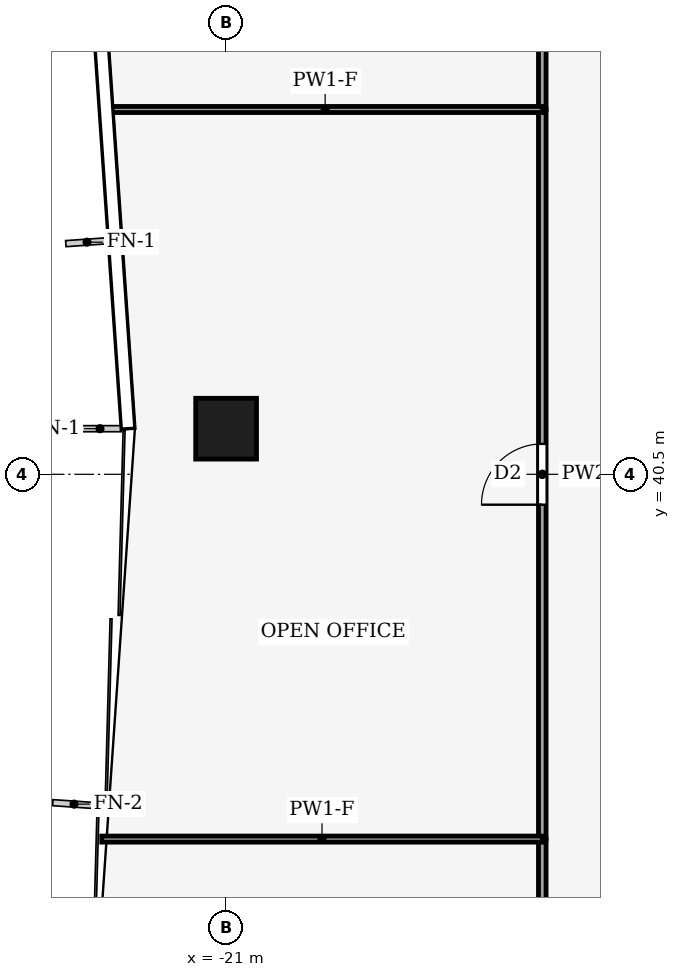
"""IFC4 building model, lengths in metres.
Left out: names, types, materials, properties, quantities, classifications, styles, units other than length and angle.
Written with IfcOpenShell. Run it as: python <this file> out.ifc"""

import sys

from ifc_helpers import new_model, si_unit, direction, frame, frame_2d, origin, origin_2d, place, context, subcontext, project, spatial, rectangle, hollow_rectangle, extrude, element, fill, save


model = new_model("IFC4")
c1 = context("Model", 3, precision=1e-05, world=origin(), true_north=direction((0.0, 1.0)))
c2 = subcontext(c1, "Body", "Model", "MODEL_VIEW")
j1 = project(units=[si_unit("LENGTHUNIT", "METRE"), si_unit("PLANEANGLEUNIT", "RADIAN")], contexts=[c1])
p1 = place(None, origin())
s1 = spatial("IfcSite", under=j1, at=p1, CompositionType="ELEMENT")
p2 = place(p1, origin())
s2 = spatial("IfcBuilding", under=s1, at=p2, CompositionType="ELEMENT")
p3 = place(p2, frame((0.0, 0.0, 238.0)))
s3 = spatial("IfcBuildingStorey", under=s2, at=p3, CompositionType="ELEMENT", Elevation=238.0)
p4 = place(p3, frame((-21.0, 41.25, 0.0), z_axis=(0.0, 0.0, 1.0), x_axis=(1.0, 0.0, 0.0)))
e1 = element("IfcColumn", 1, at=p4, inside=s3, PredefinedType="COLUMN", context=c2, shape_type="SweptSolid", body=[
    extrude(hollow_rectangle(XDim=1.0, YDim=1.0, WallThickness=0.045, at=origin_2d()), origin(), (0.0, 0.0, 1.0), 4.0),
])
p5 = place(p3, frame((-15.8, 25.5, 0.0), z_axis=(0.0, 0.0, 1.0), x_axis=(0.0, 1.0, 0.0)))
e2 = element("IfcWall", 2, at=p5, inside=s3, PredefinedType="PARTITIONING", context=c2, shape_type="SweptSolid", body=[
    extrude(rectangle(XDim=9.0, YDim=0.125, at=frame_2d((4.5, 0.0))), origin(), (0.0, 0.0, 1.0), 3.48),
])
p6 = place(p5, frame((4.0, 0.0, 0.0)))
e3 = element("IfcOpeningElement", 3, at=p6, cuts=e2, PredefinedType="OPENING", context=c2, shape_type="SweptSolid", body=[
    extrude(rectangle(XDim=1.0, YDim=2.1, at=frame_2d((0.5, 1.05))), frame((0.0, 0.073, 0.0), z_axis=(0.0, -1.0, 0.0), x_axis=(1.0, 0.0, 0.0)), (0.0, 0.0, 1.0), 0.145),
])
p7 = place(p3, frame((-15.8, 34.5, 0.0), z_axis=(0.0, 0.0, 1.0), x_axis=(0.0, 1.0, 0.0)))
e4 = element("IfcWall", 4, at=p7, inside=s3, PredefinedType="PARTITIONING", context=c2, shape_type="SweptSolid", body=[
    extrude(rectangle(XDim=12.0, YDim=0.125, at=frame_2d((6.0, 0.0))), origin(), (0.0, 0.0, 1.0), 3.14),
])
p8 = place(p7, frame((5.5, 0.0, 0.0)))
e5 = element("IfcOpeningElement", 5, at=p8, cuts=e4, PredefinedType="OPENING", context=c2, shape_type="SweptSolid", body=[
    extrude(rectangle(XDim=1.0, YDim=2.1, at=frame_2d((0.5, 1.05))), frame((0.0, 0.073, 0.0), z_axis=(0.0, -1.0, 0.0), x_axis=(1.0, 0.0, 0.0)), (0.0, 0.0, 1.0), 0.145),
])
p9 = place(p3, frame((-15.8, 46.5, 0.0), z_axis=(0.0, 0.0, 1.0), x_axis=(0.0, 1.0, 0.0)))
e6 = element("IfcWall", 6, at=p9, inside=s3, PredefinedType="PARTITIONING", context=c2, shape_type="SweptSolid", body=[
    extrude(rectangle(XDim=12.0, YDim=0.125, at=frame_2d((6.0, 0.0))), origin(), (0.0, 0.0, 1.0), 3.24),
])
p10 = place(p9, frame((5.5, 0.0, 0.0)))
e7 = element("IfcOpeningElement", 7, at=p10, cuts=e6, PredefinedType="OPENING", context=c2, shape_type="SweptSolid", body=[
    extrude(rectangle(XDim=1.0, YDim=2.1, at=frame_2d((0.5, 1.05))), frame((0.0, 0.073, 0.0), z_axis=(0.0, -1.0, 0.0), x_axis=(1.0, 0.0, 0.0)), (0.0, 0.0, 1.0), 0.145),
])
p11 = place(p3, frame((-15.8, 34.5, 0.0), z_axis=(0.0, 0.0, 1.0), x_axis=(-1.0, 0.0, 0.0)))
e8 = element("IfcWall", 8, at=p11, inside=s3, PredefinedType="PARTITIONING", context=c2, shape_type="SweptSolid", body=[
    extrude(rectangle(XDim=7.245, YDim=0.1, at=frame_2d((3.623, 0.0))), origin(), (0.0, 0.0, 1.0), 3.04),
])
p12 = place(p3, frame((-15.8, 46.5, 0.0), z_axis=(0.0, 0.0, 1.0), x_axis=(-1.0, 0.0, 0.0)))
e9 = element("IfcWall", 9, at=p12, inside=s3, PredefinedType="PARTITIONING", context=c2, shape_type="SweptSolid", body=[
    extrude(rectangle(XDim=7.142, YDim=0.1, at=frame_2d((3.571, 0.0))), origin(), (0.0, 0.0, 1.0), 3.04),
])
p13 = place(p8, origin())
e10 = element("IfcDoor", 10, at=p13, inside=s3, OperationType="SINGLE_SWING_RIGHT", PredefinedType="DOOR", context=c2, shape_type="SweptSolid", body=[
    extrude(rectangle(XDim=1.0, YDim=2.1, at=frame_2d((0.5, 1.05))), frame((0.0, 0.025, 0.0), z_axis=(0.0, -1.0, 0.0), x_axis=(1.0, 0.0, 0.0)), (0.0, 0.0, 1.0), 0.05),
])
fill(e5, e10)
save(model, sys.argv[1])
